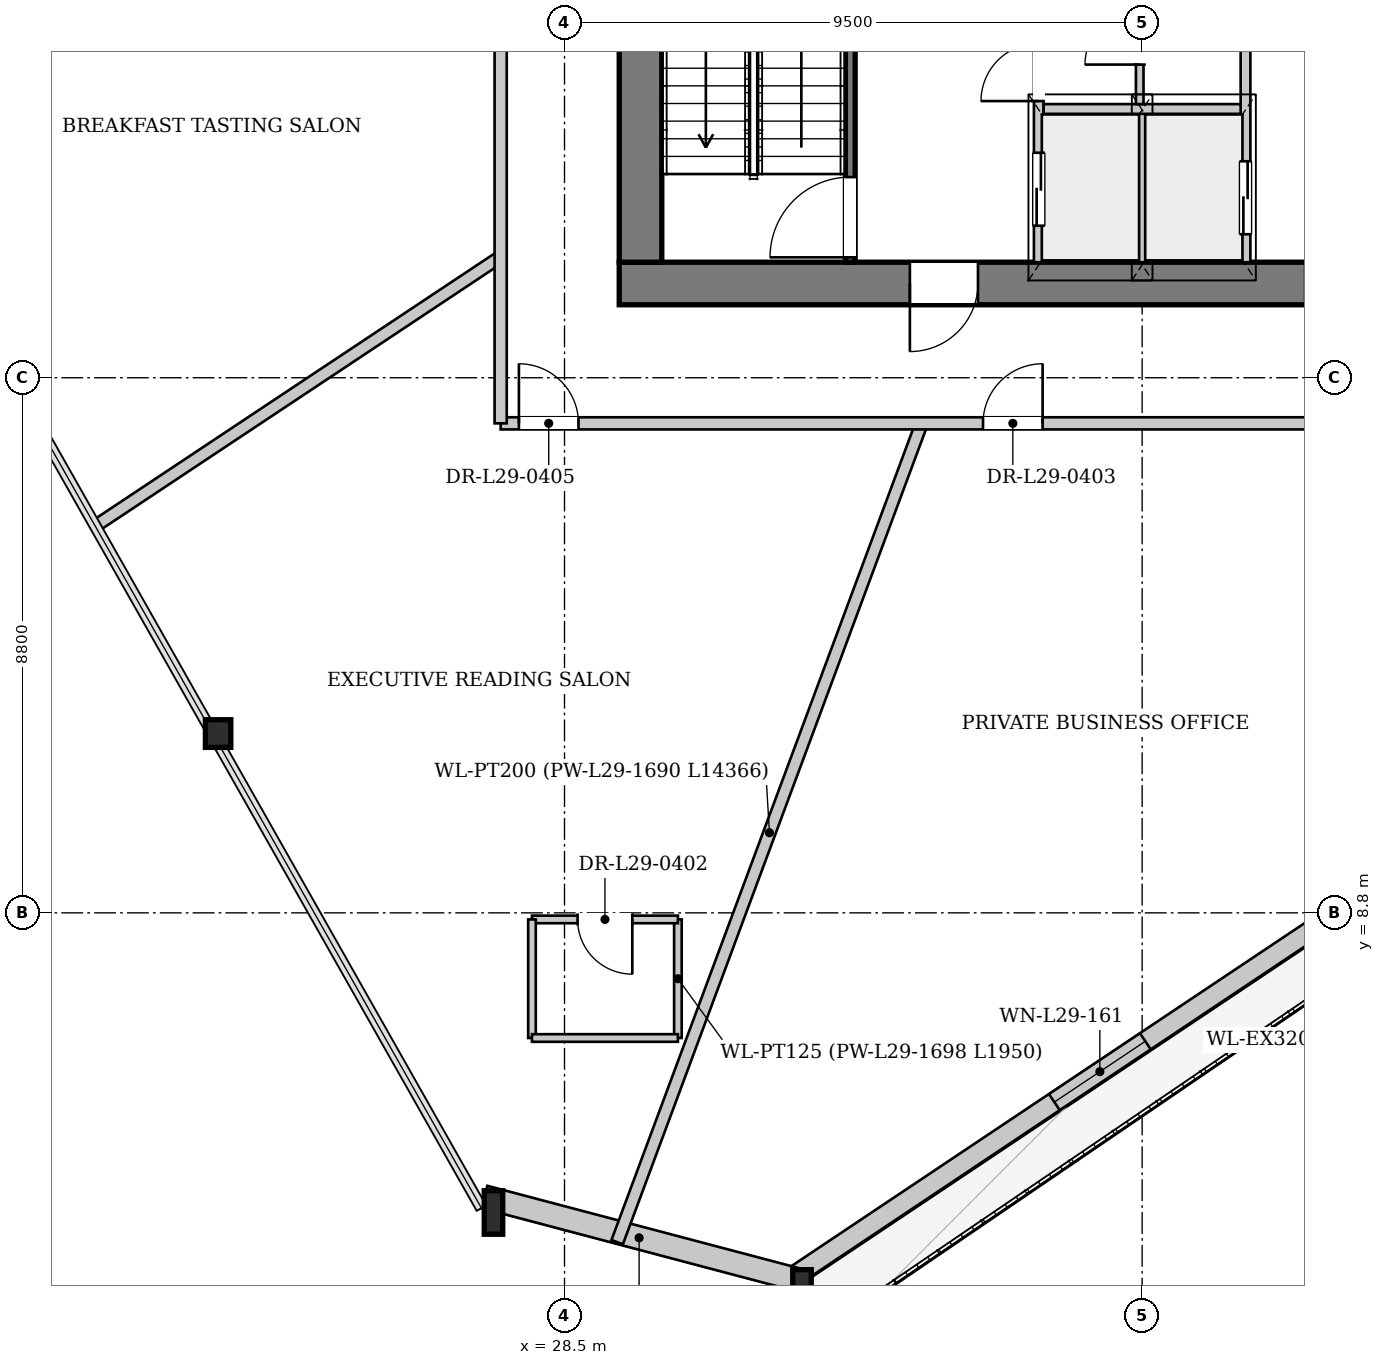
"""IFC4 building model, lengths in metres.
Left out: names, types, materials, properties, quantities, classifications, styles, units other than length and angle.
Written with IfcOpenShell. Run it as: python <this file> out.ifc"""

import sys

from ifc_helpers import new_model, si_unit, direction, frame, frame_2d, origin, origin_2d, place, context, subcontext, project, spatial, rectangle, i_section, extrude, source, transform, mapped, element, fill, save


model = new_model("IFC4")
c1 = context("Model", 3, precision=1e-05, world=origin(), true_north=direction((0.0, 1.0)))
c2 = subcontext(c1, "Body", "Model", "MODEL_VIEW")
j1 = project(units=[si_unit("LENGTHUNIT", "METRE"), si_unit("PLANEANGLEUNIT", "RADIAN")], contexts=[c1])
p1 = place(None, origin())
s1 = spatial("IfcSite", under=j1, at=p1, CompositionType="ELEMENT")
p2 = place(p1, origin())
s2 = spatial("IfcBuilding", under=s1, at=p2, CompositionType="ELEMENT")
p3 = place(p2, frame((0.0, 0.0, 112.8)))
s3 = spatial("IfcBuildingStorey", under=s2, at=p3, CompositionType="ELEMENT", Elevation=112.8)
m1 = source(origin(), c2, "Body", "SweptSolid", [
    extrude(i_section(OverallWidth=0.418, OverallDepth=0.455, WebThickness=0.038, FlangeThickness=0.059, at=origin_2d()), origin(), (0.0, 0.0, 1.0), 3.405),
])
p4 = place(p3, frame((22.655, 11.854, 0.0), z_axis=(0.087199246589, -0.062029069325, 0.994257856873), x_axis=(0.579652352195, 0.814863884704, 0.0)))
e1 = element("IfcColumn", 1, at=p4, inside=s3, PredefinedType="COLUMN", context=c2, shape_type="MappedRepresentation", body=[
    mapped(m1, transform((0.0, 0.0, 0.0), x_axis=(1.0, 0.0, 0.0), y_axis=(0.0, 1.0, 0.0), z_axis=(0.0, 0.0, 1.0), scale=1.0)),
])
m2 = source(origin(), c2, "Body", "SweptSolid", [
    extrude(i_section(OverallWidth=0.304, OverallDepth=0.716, WebThickness=0.021, FlangeThickness=0.04, at=origin_2d()), origin(), (0.0, 0.0, 1.0), 3.411),
])
p5 = place(p3, frame((27.134, 3.944, 0.0), z_axis=(0.115878413991, -0.042013977154, 0.992374434825), x_axis=(0.340857061831, 0.940115133056, 0.0)))
e2 = element("IfcColumn", 2, at=p5, inside=s3, PredefinedType="COLUMN", context=c2, shape_type="MappedRepresentation", body=[
    mapped(m2, transform((0.0, 0.0, 0.0), x_axis=(1.0, 0.0, 0.0), y_axis=(0.0, 1.0, 0.0), z_axis=(0.0, 0.0, 1.0), scale=1.0)),
])
m3 = source(origin(), c2, "Body", "SweptSolid", [
    extrude(i_section(OverallWidth=0.304, OverallDepth=0.716, WebThickness=0.021, FlangeThickness=0.04, at=origin_2d()), origin(), (0.0, 0.0, 1.0), 3.405),
])
p6 = place(p3, frame((32.222, 2.6, 0.0), z_axis=(0.107475750948, -0.014841547996, 0.994096922544), x_axis=(0.136793930518, 0.990599525829, 0.0)))
e3 = element("IfcColumn", 3, at=p6, inside=s3, PredefinedType="COLUMN", context=c2, shape_type="MappedRepresentation", body=[
    mapped(m3, transform((0.0, 0.0, 0.0), x_axis=(1.0, 0.0, 0.0), y_axis=(0.0, 1.0, 0.0), z_axis=(0.0, 0.0, 1.0), scale=1.0)),
])
p7 = place(p3, frame((52.022, 16.023, 0.0), z_axis=(0.0, 0.0, 1.0), x_axis=(-0.831442115586, -0.55561138256, 0.0)))
e4 = element("IfcWall", 4, at=p7, inside=s3, PredefinedType="SOLIDWALL", context=c2, shape_type="SweptSolid", body=[
    extrude(rectangle(XDim=23.92, YDim=0.32, at=frame_2d((11.96, 0.0))), origin(), (0.0, 0.0, 1.0), 2.692),
])
p8 = place(p7, frame((7.104, 0.0, 0.0)))
e5 = element("IfcOpeningElement", 5, at=p8, cuts=e4, PredefinedType="OPENING", context=c2, shape_type="SweptSolid", body=[
    extrude(rectangle(XDim=1.1, YDim=2.3, at=frame_2d((0.55, 1.15))), frame((0.0, 0.17, 0.0), z_axis=(0.0, -1.0, 0.0), x_axis=(1.0, 0.0, 0.0)), (0.0, 0.0, 1.0), 0.34),
])
p9 = place(p7, frame((16.801, 0.0, 0.372)))
e6 = element("IfcOpeningElement", 6, at=p9, cuts=e4, PredefinedType="OPENING", context=c2, shape_type="SweptSolid", body=[
    extrude(rectangle(XDim=1.8, YDim=2.2, at=frame_2d((0.9, 1.1))), frame((0.0, 0.17, 0.0), z_axis=(0.0, -1.0, 0.0), x_axis=(1.0, 0.0, 0.0)), (0.0, 0.0, 1.0), 0.34),
])
p10 = place(p3, frame((32.271, 2.783, 0.0), z_axis=(0.0, 0.0, 1.0), x_axis=(-0.966828311794, 0.255427123686, 0.0)))
e7 = element("IfcWall", 7, at=p10, inside=s3, PredefinedType="SOLIDWALL", context=c2, shape_type="SweptSolid", body=[
    extrude(rectangle(XDim=5.263, YDim=0.38, at=frame_2d((2.631, 0.0))), origin(), (0.0, 0.0, 1.0), 2.692),
])
p11 = place(p3, frame((46.6, 19.15, 0.0), z_axis=(0.0, 0.0, 1.0), x_axis=(-1.0, 0.0, 0.0)))
e8 = element("IfcWall", 8, at=p11, inside=s3, PredefinedType="SHEAR", context=c2, shape_type="SweptSolid", body=[
    extrude(rectangle(XDim=17.2, YDim=0.7, at=frame_2d((8.6, 0.0))), origin(), (0.0, 0.0, 1.0), 3.3),
])
p12 = place(p11, frame((4.8, 0.0, 0.0)))
e9 = element("IfcOpeningElement", 9, at=p12, cuts=e8, PredefinedType="OPENING", context=c2, shape_type="SweptSolid", body=[
    extrude(rectangle(XDim=1.12, YDim=2.25, at=frame_2d((0.56, 1.125))), frame((0.0, 0.36, 0.0), z_axis=(0.0, -1.0, 0.0), x_axis=(1.0, 0.0, 0.0)), (0.0, 0.0, 1.0), 0.72),
])
p13 = place(p11, frame((11.3, 0.0, 0.0)))
e10 = element("IfcOpeningElement", 10, at=p13, cuts=e8, PredefinedType="OPENING", context=c2, shape_type="SweptSolid", body=[
    extrude(rectangle(XDim=1.12, YDim=2.25, at=frame_2d((0.56, 1.125))), frame((0.0, 0.36, 0.0), z_axis=(0.0, -1.0, 0.0), x_axis=(1.0, 0.0, 0.0)), (0.0, 0.0, 1.0), 0.72),
])
p14 = place(p3, frame((29.75, 19.5, 0.0), z_axis=(0.0, 0.0, 1.0), x_axis=(0.0, 1.0, 0.0)))
e11 = element("IfcWall", 11, at=p14, inside=s3, PredefinedType="SHEAR", context=c2, shape_type="SweptSolid", body=[
    extrude(rectangle(XDim=14.2, YDim=0.7, at=frame_2d((7.1, 0.0))), origin(), (0.0, 0.0, 1.0), 3.3),
])
p15 = place(p14, frame((7.42, 0.0, 0.0)))
e12 = element("IfcOpeningElement", 12, at=p15, cuts=e11, PredefinedType="OPENING", context=c2, shape_type="SweptSolid", body=[
    extrude(rectangle(XDim=1.6, YDim=2.2, at=frame_2d((0.8, 1.1))), frame((0.0, 0.36, 0.0), z_axis=(0.0, -1.0, 0.0), x_axis=(1.0, 0.0, 0.0)), (0.0, 0.0, 1.0), 0.72),
])
p16 = place(p3, frame((33.2, 19.5, 0.0), z_axis=(0.0, 0.0, 1.0), x_axis=(0.0, 1.0, 0.0)))
e13 = element("IfcWall", 13, at=p16, inside=s3, PredefinedType="PARTITIONING", context=c2, shape_type="SweptSolid", body=[
    extrude(rectangle(XDim=7.46, YDim=0.16, at=frame_2d((3.73, 0.0))), origin(), (0.0, 0.0, 1.0), 3.3),
])
p17 = place(p16, frame((0.08, 0.0, 0.0)))
e14 = element("IfcOpeningElement", 14, at=p17, cuts=e13, PredefinedType="OPENING", context=c2, shape_type="SweptSolid", body=[
    extrude(rectangle(XDim=1.32, YDim=2.2, at=frame_2d((0.66, 1.1))), frame((0.0, 0.09, 0.0), z_axis=(0.0, -1.0, 0.0), x_axis=(1.0, 0.0, 0.0)), (0.0, 0.0, 1.0), 0.18),
])
p18 = place(p3, frame((36.3, 19.5, 0.0), z_axis=(0.0, 0.0, 1.0), x_axis=(0.0, 1.0, 0.0)))
e15 = element("IfcWall", 15, at=p18, inside=s3, PredefinedType="PARTITIONING", context=c2, shape_type="SweptSolid", body=[
    extrude(rectangle(XDim=4.78, YDim=0.16, at=frame_2d((2.39, 0.0))), origin(), (0.0, 0.0, 1.0), 3.3),
])
p19 = place(p18, frame((0.6, 0.0, 0.0)))
e16 = element("IfcOpeningElement", 16, at=p19, cuts=e15, PredefinedType="OPENING", context=c2, shape_type="SweptSolid", body=[
    extrude(rectangle(XDim=1.2, YDim=2.2, at=frame_2d((0.6, 1.1))), frame((0.0, 0.09, 0.0), z_axis=(0.0, -1.0, 0.0), x_axis=(1.0, 0.0, 0.0)), (0.0, 0.0, 1.0), 0.18),
])
p20 = place(p18, frame((2.65, 0.0, 0.0)))
e17 = element("IfcOpeningElement", 17, at=p20, cuts=e15, PredefinedType="OPENING", context=c2, shape_type="SweptSolid", body=[
    extrude(rectangle(XDim=0.95, YDim=2.1, at=frame_2d((0.475, 1.05))), frame((0.0, 0.09, 0.0), z_axis=(0.0, -1.0, 0.0), x_axis=(1.0, 0.0, 0.0)), (0.0, 0.0, 1.0), 0.18),
])
p21 = place(p3, frame((39.7, 24.28, 0.0), z_axis=(0.0, 0.0, 1.0), x_axis=(0.0, -1.0, 0.0)))
e18 = element("IfcWall", 18, at=p21, inside=s3, PredefinedType="PARTITIONING", context=c2, shape_type="SweptSolid", body=[
    extrude(rectangle(XDim=4.78, YDim=0.16, at=frame_2d((2.39, 0.0))), origin(), (0.0, 0.0, 1.0), 3.3),
])
p22 = place(p21, frame((3.12, 0.0, 0.0)))
e19 = element("IfcOpeningElement", 19, at=p22, cuts=e18, PredefinedType="OPENING", context=c2, shape_type="SweptSolid", body=[
    extrude(rectangle(XDim=1.2, YDim=2.2, at=frame_2d((0.6, 1.1))), frame((0.0, 0.09, 0.0), z_axis=(0.0, -1.0, 0.0), x_axis=(1.0, 0.0, 0.0)), (0.0, 0.0, 1.0), 0.18),
])
p23 = place(p3, frame((38.0, 19.5, 0.0), z_axis=(0.0, 0.0, 1.0), x_axis=(0.0, 1.0, 0.0)))
e20 = element("IfcWall", 20, at=p23, inside=s3, PredefinedType="PARTITIONING", context=c2, shape_type="SweptSolid", body=[
    extrude(rectangle(XDim=2.46, YDim=0.125, at=frame_2d((1.23, 0.0))), origin(), (0.0, 0.0, 1.0), 3.3),
])
p24 = place(p3, frame((36.38, 22.02, 0.0), z_axis=(0.0, 0.0, 1.0), x_axis=(1.0, 0.0, 0.0)))
e21 = element("IfcWall", 21, at=p24, inside=s3, PredefinedType="PARTITIONING", context=c2, shape_type="SweptSolid", body=[
    extrude(rectangle(XDim=3.24, YDim=0.16, at=frame_2d((1.62, 0.0))), origin(), (0.0, 0.0, 1.0), 3.3),
])
p25 = place(p3, frame((37.96, 22.1, 0.0), z_axis=(0.0, 0.0, 1.0), x_axis=(0.0, 1.0, 0.0)))
e22 = element("IfcWall", 22, at=p25, inside=s3, PredefinedType="PARTITIONING", context=c2, shape_type="SweptSolid", body=[
    extrude(rectangle(XDim=2.18, YDim=0.125, at=frame_2d((1.09, 0.0))), origin(), (0.0, 0.0, 1.0), 3.3),
])
p26 = place(p25, frame((0.65, 0.0, 0.0)))
e23 = element("IfcOpeningElement", 23, at=p26, cuts=e22, PredefinedType="OPENING", context=c2, shape_type="SweptSolid", body=[
    extrude(rectangle(XDim=0.9, YDim=2.1, at=frame_2d((0.45, 1.05))), frame((0.0, 0.073, 0.0), z_axis=(0.0, -1.0, 0.0), x_axis=(1.0, 0.0, 0.0)), (0.0, 0.0, 1.0), 0.145),
])
p27 = place(p3, frame((34.374, 16.85, 0.0), z_axis=(0.0, 0.0, 1.0), x_axis=(-0.348574362272, -0.937281128566, 0.0)))
e24 = element("IfcWall", 24, at=p27, inside=s3, PredefinedType="PARTITIONING", context=c2, shape_type="SweptSolid", body=[
    extrude(rectangle(XDim=14.366, YDim=0.2, at=frame_2d((7.183, 0.0))), origin(), (0.0, 0.0, 1.0), 3.3),
])
p28 = place(p3, frame((27.45, 19.591, 0.0), z_axis=(0.0, 0.0, 1.0), x_axis=(-0.832915827801, -0.55339969624, 0.0)))
e25 = element("IfcWall", 25, at=p28, inside=s3, PredefinedType="PARTITIONING", context=c2, shape_type="SweptSolid", body=[
    extrude(rectangle(XDim=7.975, YDim=0.2, at=frame_2d((3.988, 0.0))), origin(), (0.0, 0.0, 1.0), 3.3),
])
p29 = place(p3, frame((30.365, 6.742, 0.0), z_axis=(0.0, 0.0, 1.0), x_axis=(0.0, 1.0, 0.0)))
e26 = element("IfcWall", 26, at=p29, inside=s3, PredefinedType="PARTITIONING", context=c2, shape_type="SweptSolid", body=[
    extrude(rectangle(XDim=1.95, YDim=0.125, at=frame_2d((0.975, 0.0))), origin(), (0.0, 0.0, 1.0), 3.3),
])
p30 = place(p3, frame((30.365, 8.692, 0.0), z_axis=(0.0, 0.0, 1.0), x_axis=(-1.0, 0.0, 0.0)))
e27 = element("IfcWall", 27, at=p30, inside=s3, PredefinedType="PARTITIONING", context=c2, shape_type="SweptSolid", body=[
    extrude(rectangle(XDim=2.4, YDim=0.125, at=frame_2d((1.2, 0.0))), origin(), (0.0, 0.0, 1.0), 3.3),
])
p31 = place(p30, frame((0.75, 0.0, 0.0)))
e28 = element("IfcOpeningElement", 28, at=p31, cuts=e27, PredefinedType="OPENING", context=c2, shape_type="SweptSolid", body=[
    extrude(rectangle(XDim=0.9, YDim=2.1, at=frame_2d((0.45, 1.05))), frame((0.0, 0.073, 0.0), z_axis=(0.0, -1.0, 0.0), x_axis=(1.0, 0.0, 0.0)), (0.0, 0.0, 1.0), 0.145),
])
p32 = place(p3, frame((27.965, 8.692, 0.0), z_axis=(0.0, 0.0, 1.0), x_axis=(0.0, -1.0, 0.0)))
e29 = element("IfcWall", 29, at=p32, inside=s3, PredefinedType="PARTITIONING", context=c2, shape_type="SweptSolid", body=[
    extrude(rectangle(XDim=1.95, YDim=0.125, at=frame_2d((0.975, 0.0))), origin(), (0.0, 0.0, 1.0), 3.3),
])
p33 = place(p3, frame((27.965, 6.742, 0.0), z_axis=(0.0, 0.0, 1.0), x_axis=(1.0, 0.0, 0.0)))
e30 = element("IfcWall", 30, at=p33, inside=s3, PredefinedType="PARTITIONING", context=c2, shape_type="SweptSolid", body=[
    extrude(rectangle(XDim=2.4, YDim=0.125, at=frame_2d((1.2, 0.0))), origin(), (0.0, 0.0, 1.0), 3.3),
])
p34 = place(p3, frame((27.45, 16.85, 0.0), z_axis=(0.0, 0.0, 1.0), x_axis=(1.0, 0.0, 0.0)))
e31 = element("IfcWall", 31, at=p34, inside=s3, PredefinedType="PARTITIONING", context=c2, shape_type="SweptSolid", body=[
    extrude(rectangle(XDim=21.1, YDim=0.2, at=frame_2d((10.55, 0.0))), origin(), (0.0, 0.0, 1.0), 2.985),
])
p35 = place(p34, frame((7.933, 0.0, 0.0)))
e32 = element("IfcOpeningElement", 32, at=p35, cuts=e31, PredefinedType="OPENING", context=c2, shape_type="SweptSolid", body=[
    extrude(rectangle(XDim=0.98, YDim=2.15, at=frame_2d((0.49, 1.075))), frame((0.0, 0.11, 0.0), z_axis=(0.0, -1.0, 0.0), x_axis=(1.0, 0.0, 0.0)), (0.0, 0.0, 1.0), 0.22),
])
p36 = place(p34, frame((19.82, 0.0, 0.0)))
e33 = element("IfcOpeningElement", 33, at=p36, cuts=e31, PredefinedType="OPENING", context=c2, shape_type="SweptSolid", body=[
    extrude(rectangle(XDim=0.98, YDim=2.15, at=frame_2d((0.49, 1.075))), frame((0.0, 0.11, 0.0), z_axis=(0.0, -1.0, 0.0), x_axis=(1.0, 0.0, 0.0)), (0.0, 0.0, 1.0), 0.22),
])
p37 = place(p34, frame((0.3, 0.0, 0.0)))
e34 = element("IfcOpeningElement", 34, at=p37, cuts=e31, PredefinedType="OPENING", context=c2, shape_type="SweptSolid", body=[
    extrude(rectangle(XDim=0.98, YDim=2.15, at=frame_2d((0.49, 1.075))), frame((0.0, 0.11, 0.0), z_axis=(0.0, -1.0, 0.0), x_axis=(1.0, 0.0, 0.0)), (0.0, 0.0, 1.0), 0.22),
])
p38 = place(p3, frame((27.45, 16.85, 0.0), z_axis=(0.0, 0.0, 1.0), x_axis=(0.0, 1.0, 0.0)))
e35 = element("IfcWall", 35, at=p38, inside=s3, PredefinedType="PARTITIONING", context=c2, shape_type="SweptSolid", body=[
    extrude(rectangle(XDim=19.5, YDim=0.2, at=frame_2d((9.75, 0.0))), origin(), (0.0, 0.0, 1.0), 3.3),
])
p39 = place(p38, frame((18.22, 0.0, 0.0)))
e36 = element("IfcOpeningElement", 36, at=p39, cuts=e35, PredefinedType="OPENING", context=c2, shape_type="SweptSolid", body=[
    extrude(rectangle(XDim=0.98, YDim=2.15, at=frame_2d((0.49, 1.075))), frame((0.0, 0.11, 0.0), z_axis=(0.0, -1.0, 0.0), x_axis=(1.0, 0.0, 0.0)), (0.0, 0.0, 1.0), 0.22),
])
p40 = place(p38, frame((7.666, 0.0, 0.0)))
e37 = element("IfcOpeningElement", 37, at=p40, cuts=e35, PredefinedType="OPENING", context=c2, shape_type="SweptSolid", body=[
    extrude(rectangle(XDim=0.98, YDim=2.15, at=frame_2d((0.49, 1.075))), frame((0.0, 0.11, 0.0), z_axis=(0.0, -1.0, 0.0), x_axis=(1.0, 0.0, 0.0)), (0.0, 0.0, 1.0), 0.22),
])
m4 = source(origin(), c2, "Body", "SweptSolid", [
    extrude(rectangle(XDim=1.8, YDim=2.2, at=frame_2d((0.9, 1.1))), frame((0.0, 0.03, 0.0), z_axis=(0.0, -1.0, 0.0), x_axis=(1.0, 0.0, 0.0)), (0.0, 0.0, 1.0), 0.06),
])
p41 = place(p9, origin())
e38 = element("IfcWindow", 38, at=p41, inside=s3, PartitioningType="SINGLE_PANEL", PredefinedType="WINDOW", context=c2, shape_type="MappedRepresentation", body=[
    mapped(m4, transform((0.0, 0.0, 0.0), x_axis=(1.0, 0.0, 0.0), y_axis=(0.0, 1.0, 0.0), z_axis=(0.0, 0.0, 1.0), scale=1.0)),
])
fill(e6, e38)
m5 = source(origin(), c2, "Body", "SweptSolid", [
    extrude(rectangle(XDim=1.12, YDim=2.25, at=frame_2d((0.56, 1.125))), frame((0.0, 0.025, 0.0), z_axis=(0.0, -1.0, 0.0), x_axis=(1.0, 0.0, 0.0)), (0.0, 0.0, 1.0), 0.05),
])
p42 = place(p13, origin())
e39 = element("IfcDoor", 39, at=p42, inside=s3, OperationType="SINGLE_SWING_RIGHT", PredefinedType="DOOR", context=c2, shape_type="MappedRepresentation", body=[
    mapped(m5, transform((0.0, 0.0, 0.0), x_axis=(1.0, 0.0, 0.0), y_axis=(0.0, 1.0, 0.0), z_axis=(0.0, 0.0, 1.0), scale=1.0)),
])
fill(e10, e39)
m6 = source(origin(), c2, "Body", "SweptSolid", [
    extrude(rectangle(XDim=1.32, YDim=2.2, at=frame_2d((0.66, 1.1))), frame((0.0, 0.025, 0.0), z_axis=(0.0, -1.0, 0.0), x_axis=(1.0, 0.0, 0.0)), (0.0, 0.0, 1.0), 0.05),
])
p43 = place(p17, origin())
e40 = element("IfcDoor", 40, at=p43, inside=s3, OperationType="SINGLE_SWING_LEFT", PredefinedType="DOOR", context=c2, shape_type="MappedRepresentation", body=[
    mapped(m6, transform((0.0, 0.0, 0.0), x_axis=(1.0, 0.0, 0.0), y_axis=(0.0, 1.0, 0.0), z_axis=(0.0, 0.0, 1.0), scale=1.0)),
])
fill(e14, e40)
m7 = source(origin(), c2, "Body", "SweptSolid", [
    extrude(rectangle(XDim=1.2, YDim=2.2, at=frame_2d((0.6, 1.1))), frame((0.0, 0.025, 0.0), z_axis=(0.0, -1.0, 0.0), x_axis=(1.0, 0.0, 0.0)), (0.0, 0.0, 1.0), 0.05),
])
p44 = place(p19, origin())
e41 = element("IfcDoor", 41, at=p44, inside=s3, OperationType="DOUBLE_DOOR_SLIDING", PredefinedType="DOOR", context=c2, shape_type="MappedRepresentation", body=[
    mapped(m7, transform((0.0, 0.0, 0.0), x_axis=(1.0, 0.0, 0.0), y_axis=(0.0, 1.0, 0.0), z_axis=(0.0, 0.0, 1.0), scale=1.0)),
])
fill(e16, e41)
m8 = source(origin(), c2, "Body", "SweptSolid", [
    extrude(rectangle(XDim=0.95, YDim=2.1, at=frame_2d((0.475, 1.05))), frame((0.0, 0.025, 0.0), z_axis=(0.0, -1.0, 0.0), x_axis=(1.0, 0.0, 0.0)), (0.0, 0.0, 1.0), 0.05),
])
p45 = place(p20, origin())
e42 = element("IfcDoor", 42, at=p45, inside=s3, OperationType="SINGLE_SWING_LEFT", PredefinedType="DOOR", context=c2, shape_type="MappedRepresentation", body=[
    mapped(m8, transform((0.0, 0.0, 0.0), x_axis=(1.0, 0.0, 0.0), y_axis=(0.0, 1.0, 0.0), z_axis=(0.0, 0.0, 1.0), scale=1.0)),
])
fill(e17, e42)
m9 = source(origin(), c2, "Body", "SweptSolid", [
    extrude(rectangle(XDim=0.9, YDim=2.1, at=frame_2d((0.45, 1.05))), frame((0.0, 0.025, 0.0), z_axis=(0.0, -1.0, 0.0), x_axis=(1.0, 0.0, 0.0)), (0.0, 0.0, 1.0), 0.05),
])
p46 = place(p26, origin())
e43 = element("IfcDoor", 43, at=p46, inside=s3, OperationType="SINGLE_SWING_LEFT", PredefinedType="DOOR", context=c2, shape_type="MappedRepresentation", body=[
    mapped(m9, transform((0.0, 0.0, 0.0), x_axis=(1.0, 0.0, 0.0), y_axis=(0.0, 1.0, 0.0), z_axis=(0.0, 0.0, 1.0), scale=1.0)),
])
fill(e23, e43)
p47 = place(p22, origin())
e44 = element("IfcDoor", 44, at=p47, inside=s3, OperationType="DOUBLE_DOOR_SLIDING", PredefinedType="DOOR", context=c2, shape_type="MappedRepresentation", body=[
    mapped(m7, transform((0.0, 0.0, 0.0), x_axis=(1.0, 0.0, 0.0), y_axis=(0.0, 1.0, 0.0), z_axis=(0.0, 0.0, 1.0), scale=1.0)),
])
fill(e19, e44)
p48 = place(p31, origin())
e45 = element("IfcDoor", 45, at=p48, inside=s3, OperationType="SINGLE_SWING_LEFT", PredefinedType="DOOR", context=c2, shape_type="MappedRepresentation", body=[
    mapped(m9, transform((0.0, 0.0, 0.0), x_axis=(1.0, 0.0, 0.0), y_axis=(0.0, 1.0, 0.0), z_axis=(0.0, 0.0, 1.0), scale=1.0)),
])
fill(e28, e45)
m10 = source(origin(), c2, "Body", "SweptSolid", [
    extrude(rectangle(XDim=0.98, YDim=2.15, at=frame_2d((0.49, 1.075))), frame((0.0, 0.025, 0.0), z_axis=(0.0, -1.0, 0.0), x_axis=(1.0, 0.0, 0.0)), (0.0, 0.0, 1.0), 0.05),
])
p49 = place(p35, origin())
e46 = element("IfcDoor", 46, at=p49, inside=s3, OperationType="SINGLE_SWING_RIGHT", PredefinedType="DOOR", context=c2, shape_type="MappedRepresentation", body=[
    mapped(m10, transform((0.0, 0.0, 0.0), x_axis=(1.0, 0.0, 0.0), y_axis=(0.0, 1.0, 0.0), z_axis=(0.0, 0.0, 1.0), scale=1.0)),
])
fill(e32, e46)
p50 = place(p37, origin())
e47 = element("IfcDoor", 47, at=p50, inside=s3, OperationType="SINGLE_SWING_LEFT", PredefinedType="DOOR", context=c2, shape_type="MappedRepresentation", body=[
    mapped(m10, transform((0.0, 0.0, 0.0), x_axis=(1.0, 0.0, 0.0), y_axis=(0.0, 1.0, 0.0), z_axis=(0.0, 0.0, 1.0), scale=1.0)),
])
fill(e34, e47)
save(model, sys.argv[1])
